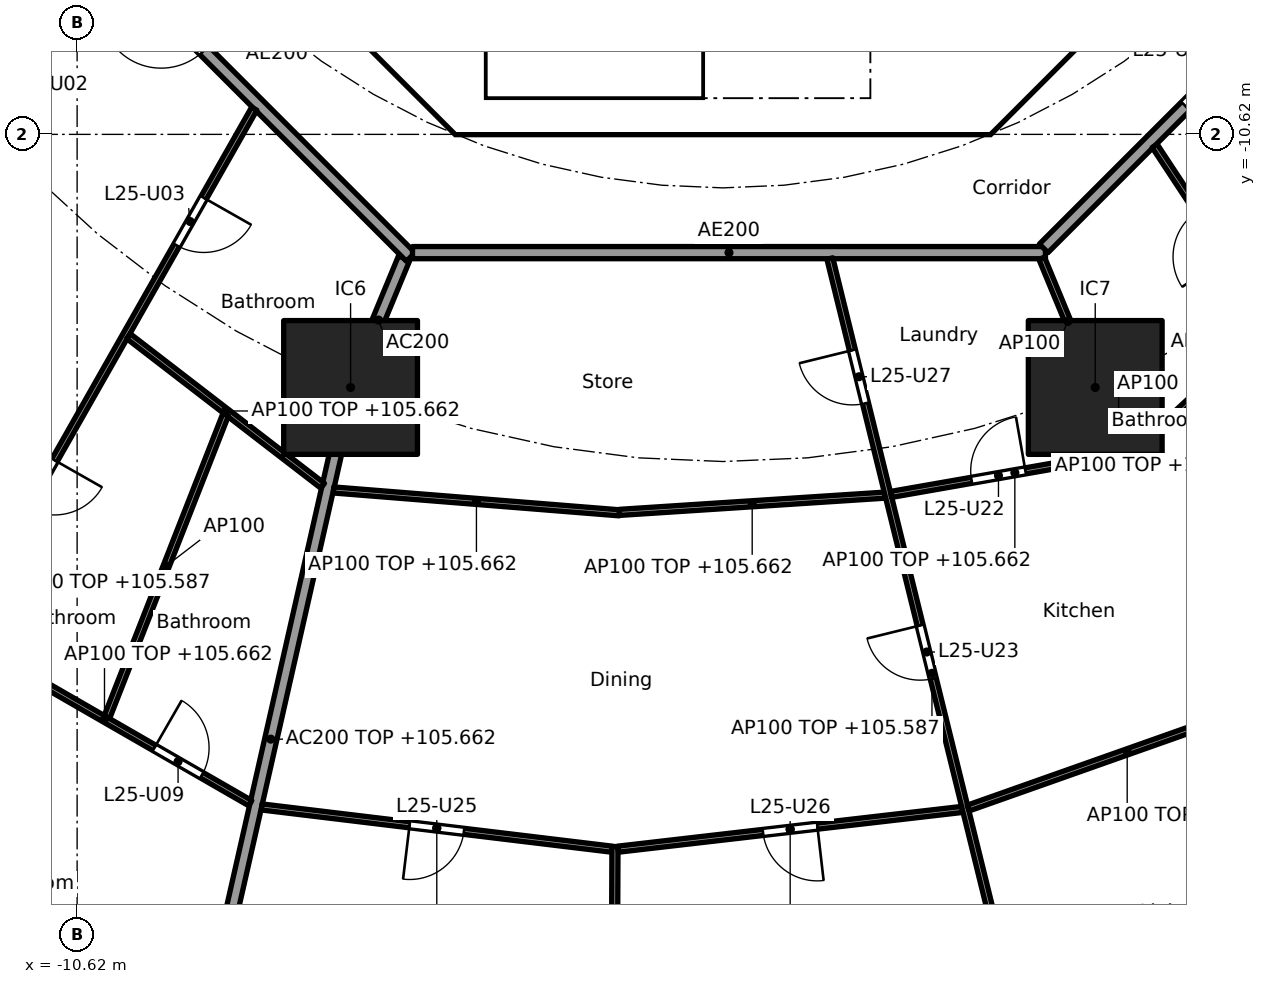
"""IFC4 building model, lengths in metres.
Left out: names, types, materials, properties, quantities, classifications, styles, units other than length and angle.
Written with IfcOpenShell. Run it as: python <this file> out.ifc"""

import sys

from ifc_helpers import new_model, si_unit, direction, frame, frame_2d, origin, origin_2d, place, context, subcontext, project, spatial, polyline, rectangle, outline, extrude, element, fill, save


model = new_model("IFC4")
c1 = context("Model", 3, precision=1e-05, world=origin(), true_north=direction((0.0, 1.0)))
c2 = subcontext(c1, "Body", "Model", "MODEL_VIEW")
j1 = project(units=[si_unit("LENGTHUNIT", "METRE"), si_unit("PLANEANGLEUNIT", "RADIAN")], contexts=[c1])
p1 = place(None, origin())
s1 = spatial("IfcSite", under=j1, at=p1, CompositionType="ELEMENT")
p2 = place(p1, origin())
s2 = spatial("IfcBuilding", under=s1, at=p2, CompositionType="ELEMENT")
p3 = place(p2, frame((0.0, 0.0, 102.9)))
s3 = spatial("IfcBuildingStorey", under=s2, at=p3, CompositionType="ELEMENT", Elevation=102.9)
for number, where, z_axis, x_axis in (
    (1, (-6.123, -14.782, 0.0), (0.0, 0.0, 1.0), (1.0, 0.0, 0.0)),
    (2, (6.123, -14.782, 0.0), (0.0, 0.0, 1.0), (1.0, 0.0, 0.0)),
):
    element("IfcColumn", number, at=place(p3, frame(where, z_axis=z_axis, x_axis=x_axis)), inside=s3, PredefinedType="COLUMN", context=c2, shape_type="SweptSolid", body=[
        extrude(rectangle(XDim=2.2, YDim=2.2, at=origin_2d()), origin(), (0.0, 0.0, 1.0), 3.7),
    ])
p4 = place(p3, frame((-9.988, -4.613, 0.0), z_axis=(0.0, 0.0, 1.0), x_axis=(0.707106781187, -0.707106781187, 0.0)))
e3 = element("IfcWall", 3, at=p4, inside=s3, PredefinedType="SHEAR", context=c2, shape_type="SweptSolid", body=[
    extrude(rectangle(XDim=7.602, YDim=0.6, at=frame_2d((3.801, 0.0))), origin(), (0.0, 0.0, 1.0), 3.44),
])
p5 = place(p4, frame((6.151, 0.0, 0.0)))
e4 = element("IfcOpeningElement", 4, at=p5, cuts=e3, PredefinedType="OPENING", context=c2, shape_type="SweptSolid", body=[
    extrude(rectangle(XDim=1.1, YDim=2.1, at=frame_2d((0.55, 1.05))), frame((0.0, 0.31, 0.0), z_axis=(0.0, -1.0, 0.0), x_axis=(1.0, 0.0, 0.0)), (0.0, 0.0, 1.0), 0.62),
])
p6 = place(p3, frame((4.613, -9.988, 0.0), z_axis=(0.0, 0.0, 1.0), x_axis=(0.707106781187, 0.707106781187, 0.0)))
e5 = element("IfcWall", 5, at=p6, inside=s3, PredefinedType="SHEAR", context=c2, shape_type="SweptSolid", body=[
    extrude(rectangle(XDim=7.602, YDim=0.6, at=frame_2d((3.801, 0.0))), origin(), (0.0, 0.0, 1.0), 3.44),
])
p7 = place(p6, frame((3.201, 0.0, 0.0)))
e6 = element("IfcOpeningElement", 6, at=p7, cuts=e5, PredefinedType="OPENING", context=c2, shape_type="SweptSolid", body=[
    extrude(rectangle(XDim=1.2, YDim=2.1, at=frame_2d((0.6, 1.05))), frame((0.0, 0.31, 0.0), z_axis=(0.0, -1.0, 0.0), x_axis=(1.0, 0.0, 0.0)), (0.0, 0.0, 1.0), 0.62),
])
p8 = place(p3, frame((4.0, -10.025, 0.0), z_axis=(0.0, 0.0, 1.0), x_axis=(0.0, 1.0, 0.0)))
e7 = element("IfcWall", 7, at=p8, inside=s3, PredefinedType="SOLIDWALL", context=c2, shape_type="SweptSolid", body=[
    extrude(rectangle(XDim=3.0, YDim=0.2, at=frame_2d((1.5, 0.0))), origin(), (0.0, 0.0, 1.0), 3.44),
])
p9 = place(p8, frame((0.975, 0.0, 0.0)))
e8 = element("IfcOpeningElement", 8, at=p9, cuts=e7, PredefinedType="OPENING", context=c2, shape_type="SweptSolid", body=[
    extrude(rectangle(XDim=1.1, YDim=2.1, at=frame_2d((0.55, 1.05))), frame((0.0, 0.11, 0.0), z_axis=(0.0, -1.0, 0.0), x_axis=(1.0, 0.0, 0.0)), (0.0, 0.0, 1.0), 0.22),
])
p10 = place(p3, origin())
e9 = element("IfcWall", 9, at=p10, inside=s3, PredefinedType="SHEAR", context=c2, shape_type="SweptSolid", body=[
    extrude(outline(polyline([(-4.152, -10.025), (4.152, -10.025), (4.401, -9.776), (4.825, -10.2), (4.401, -10.625), (-4.401, -10.625), (-4.825, -10.2), (-4.401, -9.776), (-4.152, -10.025)])), origin(), (0.0, 0.0, 1.0), 3.44),
])
p11 = place(p3, origin())
e10 = element("IfcWall", 10, at=p11, inside=s3, PredefinedType="SOLIDWALL", context=c2, shape_type="SweptSolid", body=[
    extrude(outline(polyline([(-3.9, -10.025), (-4.1, -10.025), (-4.1, -7.025), (-3.9, -7.025), (-3.9, -10.025)])), origin(), (0.0, 0.0, 1.0), 3.44),
])
p12 = place(p3, frame((-5.243, -12.657, 0.0), z_axis=(0.0, 0.0, 1.0), x_axis=(-0.382668627144, -0.923885664896, 0.0)))
e11 = element("IfcWall", 11, at=p12, inside=s3, PredefinedType="PARTITIONING", context=c2, shape_type="SweptSolid", body=[
    extrude(rectangle(XDim=2.2, YDim=0.2, at=frame_2d((1.1, 0.0))), origin(), (0.0, 0.0, 1.0), 3.44),
])
p13 = place(p3, frame((-6.134, -14.831, 0.0), z_axis=(0.0, 0.0, 1.0), x_axis=(-0.221225405869, -0.975222702667, 0.0)))
e12 = element("IfcWall", 12, at=p13, inside=s3, PredefinedType="PARTITIONING", context=c2, shape_type="SweptSolid", body=[
    extrude(rectangle(XDim=11.761, YDim=0.2, at=frame_2d((5.88, 0.0))), origin(), (0.0, 0.0, 1.0), 2.762),
])
p14 = place(p3, frame((-12.635, -5.134, 0.0), z_axis=(0.0, 0.0, 1.0), x_axis=(0.707106781187, -0.707106781187, 0.0)))
e13 = element("IfcWall", 13, at=p14, inside=s3, PredefinedType="PARTITIONING", context=c2, shape_type="SweptSolid", body=[
    extrude(rectangle(XDim=10.609, YDim=0.2, at=frame_2d((5.305, 0.0))), origin(), (0.0, 0.0, 1.0), 3.44),
])
p15 = place(p14, frame((4.804, 0.0, 0.0)))
e14 = element("IfcOpeningElement", 14, at=p15, cuts=e13, PredefinedType="OPENING", context=c2, shape_type="SweptSolid", body=[
    extrude(rectangle(XDim=1.0, YDim=2.1, at=frame_2d((0.5, 1.05))), frame((0.0, 0.11, 0.0), z_axis=(0.0, -1.0, 0.0), x_axis=(1.0, 0.0, 0.0)), (0.0, 0.0, 1.0), 0.22),
])
p16 = place(p3, frame((-5.104, -12.565, 0.0), z_axis=(0.0, 0.0, 1.0), x_axis=(1.0, 0.0, 0.0)))
e15 = element("IfcWall", 15, at=p16, inside=s3, PredefinedType="PARTITIONING", context=c2, shape_type="SweptSolid", body=[
    extrude(rectangle(XDim=10.409, YDim=0.2, at=frame_2d((5.205, 0.0))), origin(), (0.0, 0.0, 1.0), 3.44),
])
p17 = place(p3, frame((5.275, -12.494, 0.0), z_axis=(0.0, 0.0, 1.0), x_axis=(0.707106781187, 0.707106781187, 0.0)))
e16 = element("IfcWall", 16, at=p17, inside=s3, PredefinedType="PARTITIONING", context=c2, shape_type="SweptSolid", body=[
    extrude(rectangle(XDim=10.409, YDim=0.2, at=frame_2d((5.205, 0.0))), origin(), (0.0, 0.0, 1.0), 3.44),
])
p18 = place(p17, frame((3.303, 0.0, 0.0)))
e17 = element("IfcOpeningElement", 17, at=p18, cuts=e16, PredefinedType="OPENING", context=c2, shape_type="SweptSolid", body=[
    extrude(rectangle(XDim=1.0, YDim=2.1, at=frame_2d((0.5, 1.05))), frame((0.0, 0.11, 0.0), z_axis=(0.0, -1.0, 0.0), x_axis=(1.0, 0.0, 0.0)), (0.0, 0.0, 1.0), 0.22),
])
p19 = place(p3, frame((-10.181, -7.729, 0.0), z_axis=(0.0, 0.0, 1.0), x_axis=(-0.699710752188, -0.714426247609, 0.0)))
e18 = element("IfcWall", 18, at=p19, inside=s3, PredefinedType="PARTITIONING", context=c2, shape_type="SweptSolid", body=[
    extrude(rectangle(XDim=9.938, YDim=0.1, at=frame_2d((4.969, 0.0))), origin(), (0.0, 0.0, 1.0), 2.687),
])
p20 = place(p19, frame((1.675, 0.0, 0.0)))
e19 = element("IfcOpeningElement", 19, at=p20, cuts=e18, PredefinedType="OPENING", context=c2, shape_type="SweptSolid", body=[
    extrude(rectangle(XDim=0.9, YDim=2.1, at=frame_2d((0.45, 1.05))), frame((0.0, 0.06, 0.0), z_axis=(0.0, -1.0, 0.0), x_axis=(1.0, 0.0, 0.0)), (0.0, 0.0, 1.0), 0.12),
])
p21 = place(p19, frame((6.619, 0.0, 0.0)))
e20 = element("IfcOpeningElement", 20, at=p21, cuts=e18, PredefinedType="OPENING", context=c2, shape_type="SweptSolid", body=[
    extrude(rectangle(XDim=0.9, YDim=2.1, at=frame_2d((0.45, 1.05))), frame((0.0, 0.06, 0.0), z_axis=(0.0, -1.0, 0.0), x_axis=(1.0, 0.0, 0.0)), (0.0, 0.0, 1.0), 0.12),
])
p22 = place(p3, frame((-7.707, -10.198, 0.0), z_axis=(0.0, 0.0, 1.0), x_axis=(-0.49395524734, -0.869487328042, 0.0)))
e21 = element("IfcWall", 21, at=p22, inside=s3, PredefinedType="PARTITIONING", context=c2, shape_type="SweptSolid", body=[
    extrude(rectangle(XDim=15.025, YDim=0.1, at=frame_2d((7.512, 0.0))), origin(), (0.0, 0.0, 1.0), 2.687),
])
p23 = place(p22, frame((1.684, 0.0, 0.0)))
e22 = element("IfcOpeningElement", 22, at=p23, cuts=e21, PredefinedType="OPENING", context=c2, shape_type="SweptSolid", body=[
    extrude(rectangle(XDim=0.9, YDim=2.1, at=frame_2d((0.45, 1.05))), frame((0.0, 0.06, 0.0), z_axis=(0.0, -1.0, 0.0), x_axis=(1.0, 0.0, 0.0)), (0.0, 0.0, 1.0), 0.12),
])
p24 = place(p22, frame((6.648, 0.0, 0.0)))
e23 = element("IfcOpeningElement", 23, at=p24, cuts=e21, PredefinedType="OPENING", context=c2, shape_type="SweptSolid", body=[
    extrude(rectangle(XDim=0.9, YDim=2.1, at=frame_2d((0.45, 1.05))), frame((0.0, 0.06, 0.0), z_axis=(0.0, -1.0, 0.0), x_axis=(1.0, 0.0, 0.0)), (0.0, 0.0, 1.0), 0.12),
])
p25 = place(p22, frame((12.027, 0.0, 0.0)))
e24 = element("IfcOpeningElement", 24, at=p25, cuts=e21, PredefinedType="OPENING", context=c2, shape_type="SweptSolid", body=[
    extrude(rectangle(XDim=0.9, YDim=2.1, at=frame_2d((0.45, 1.05))), frame((0.0, 0.06, 0.0), z_axis=(0.0, -1.0, 0.0), x_axis=(1.0, 0.0, 0.0)), (0.0, 0.0, 1.0), 0.12),
])
p26 = place(p3, frame((-9.775, -13.939, 0.0), z_axis=(0.0, 0.0, 1.0), x_axis=(0.792162117554, -0.610310723741, 0.0)))
e25 = element("IfcWall", 25, at=p26, inside=s3, PredefinedType="PARTITIONING", context=c2, shape_type="SweptSolid", body=[
    extrude(rectangle(XDim=4.03, YDim=0.1, at=frame_2d((2.015, 0.0))), origin(), (0.0, 0.0, 1.0), 2.762),
])
p27 = place(p3, frame((-12.568, -18.856, 0.0), z_axis=(0.0, 0.0, 1.0), x_axis=(0.866533437451, -0.499119025664, 0.0)))
e26 = element("IfcWall", 26, at=p27, inside=s3, PredefinedType="PARTITIONING", context=c2, shape_type="SweptSolid", body=[
    extrude(rectangle(XDim=5.535, YDim=0.1, at=frame_2d((2.768, 0.0))), origin(), (0.0, 0.0, 1.0), 2.762),
])
p28 = place(p27, frame((3.714, 0.0, 0.0)))
e27 = element("IfcOpeningElement", 27, at=p28, cuts=e26, PredefinedType="OPENING", context=c2, shape_type="SweptSolid", body=[
    extrude(rectangle(XDim=0.9, YDim=2.1, at=frame_2d((0.45, 1.05))), frame((0.0, 0.06, 0.0), z_axis=(0.0, -1.0, 0.0), x_axis=(1.0, 0.0, 0.0)), (0.0, 0.0, 1.0), 0.12),
])
p29 = place(p3, frame((-8.177, -15.231, 0.0), z_axis=(0.0, 0.0, 1.0), x_axis=(-0.365520869553, -0.930803144559, 0.0)))
e28 = element("IfcWall", 28, at=p29, inside=s3, PredefinedType="PARTITIONING", context=c2, shape_type="SweptSolid", body=[
    extrude(rectangle(XDim=5.342, YDim=0.1, at=frame_2d((2.671, 0.0))), origin(), (0.0, 0.0, 1.0), 3.44),
])
p30 = place(p3, frame((-6.404, -16.468, 0.0), z_axis=(0.0, 0.0, 1.0), x_axis=(0.996817253426, -0.079720532316, 0.0)))
e29 = element("IfcWall", 29, at=p30, inside=s3, PredefinedType="PARTITIONING", context=c2, shape_type="SweptSolid", body=[
    extrude(rectangle(XDim=4.716, YDim=0.1, at=frame_2d((2.358, 0.0))), origin(), (0.0, 0.0, 1.0), 2.762),
])
p31 = place(p3, frame((-7.586, -21.68, 0.0), z_axis=(0.0, 0.0, 1.0), x_axis=(0.992810189026, -0.119699325668, 0.0)))
e30 = element("IfcWall", 30, at=p31, inside=s3, PredefinedType="PARTITIONING", context=c2, shape_type="SweptSolid", body=[
    extrude(rectangle(XDim=5.803, YDim=0.1, at=frame_2d((2.901, 0.0))), origin(), (0.0, 0.0, 1.0), 2.762),
])
p32 = place(p31, frame((2.451, 0.0, 0.0)))
e31 = element("IfcOpeningElement", 31, at=p32, cuts=e30, PredefinedType="OPENING", context=c2, shape_type="SweptSolid", body=[
    extrude(rectangle(XDim=0.9, YDim=2.1, at=frame_2d((0.45, 1.05))), frame((0.0, 0.06, 0.0), z_axis=(0.0, -1.0, 0.0), x_axis=(1.0, 0.0, 0.0)), (0.0, 0.0, 1.0), 0.12),
])
p33 = place(p3, frame((-1.703, -16.836, 0.0), z_axis=(0.0, 0.0, 1.0), x_axis=(0.997897941075, 0.064805086209, 0.0)))
e32 = element("IfcWall", 32, at=p33, inside=s3, PredefinedType="PARTITIONING", context=c2, shape_type="SweptSolid", body=[
    extrude(rectangle(XDim=4.378, YDim=0.1, at=frame_2d((2.189, 0.0))), origin(), (0.0, 0.0, 1.0), 2.762),
])
p34 = place(p3, frame((-1.775, -22.331, 0.0), z_axis=(0.0, 0.0, 1.0), x_axis=(-0.004088153894, -0.999991643464, 0.0)))
e33 = element("IfcWall", 33, at=p34, inside=s3, PredefinedType="PARTITIONING", context=c2, shape_type="SweptSolid", body=[
    extrude(rectangle(XDim=5.016, YDim=0.1, at=frame_2d((2.508, 0.0))), origin(), (0.0, 0.0, 1.0), 2.762),
])
p35 = place(p3, frame((-1.726, -22.375, 0.0), z_axis=(0.0, 0.0, 1.0), x_axis=(0.99339223329, 0.114768771187, 0.0)))
e34 = element("IfcWall", 34, at=p35, inside=s3, PredefinedType="PARTITIONING", context=c2, shape_type="SweptSolid", body=[
    extrude(rectangle(XDim=5.701, YDim=0.1, at=frame_2d((2.851, 0.0))), origin(), (0.0, 0.0, 1.0), 2.762),
])
p36 = place(p35, frame((2.4, 0.0, 0.0)))
e35 = element("IfcOpeningElement", 35, at=p36, cuts=e34, PredefinedType="OPENING", context=c2, shape_type="SweptSolid", body=[
    extrude(rectangle(XDim=0.9, YDim=2.1, at=frame_2d((0.45, 1.05))), frame((0.0, 0.06, 0.0), z_axis=(0.0, -1.0, 0.0), x_axis=(1.0, 0.0, 0.0)), (0.0, 0.0, 1.0), 0.12),
])
p37 = place(p3, frame((1.759, -12.662, 0.0), z_axis=(0.0, 0.0, 1.0), x_axis=(0.239021819854, -0.971014196412, 0.0)))
e36 = element("IfcWall", 36, at=p37, inside=s3, PredefinedType="PARTITIONING", context=c2, shape_type="SweptSolid", body=[
    extrude(rectangle(XDim=14.05, YDim=0.1, at=frame_2d((7.025, 0.0))), origin(), (0.0, 0.0, 1.0), 2.687),
])
p38 = place(p37, frame((6.214, 0.0, 0.0)))
e37 = element("IfcOpeningElement", 37, at=p38, cuts=e36, PredefinedType="OPENING", context=c2, shape_type="SweptSolid", body=[
    extrude(rectangle(XDim=0.9, YDim=2.1, at=frame_2d((0.45, 1.05))), frame((0.0, 0.06, 0.0), z_axis=(0.0, -1.0, 0.0), x_axis=(1.0, 0.0, 0.0)), (0.0, 0.0, 1.0), 0.12),
])
p39 = place(p37, frame((1.552, 0.0, 0.0)))
e38 = element("IfcOpeningElement", 38, at=p39, cuts=e36, PredefinedType="OPENING", context=c2, shape_type="SweptSolid", body=[
    extrude(rectangle(XDim=0.9, YDim=2.1, at=frame_2d((0.45, 1.05))), frame((0.0, 0.06, 0.0), z_axis=(0.0, -1.0, 0.0), x_axis=(1.0, 0.0, 0.0)), (0.0, 0.0, 1.0), 0.12),
])
p40 = place(p3, frame((2.765, -16.541, 0.0), z_axis=(0.0, 0.0, 1.0), x_axis=(0.984998612286, 0.172562260633, 0.0)))
e39 = element("IfcWall", 39, at=p40, inside=s3, PredefinedType="PARTITIONING", context=c2, shape_type="SweptSolid", body=[
    extrude(rectangle(XDim=4.134, YDim=0.1, at=frame_2d((2.067, 0.0))), origin(), (0.0, 0.0, 1.0), 2.762),
])
p41 = place(p40, frame((1.344, 0.0, 0.0)))
e40 = element("IfcOpeningElement", 40, at=p41, cuts=e39, PredefinedType="OPENING", context=c2, shape_type="SweptSolid", body=[
    extrude(rectangle(XDim=0.9, YDim=2.1, at=frame_2d((0.45, 1.05))), frame((0.0, 0.06, 0.0), z_axis=(0.0, -1.0, 0.0), x_axis=(1.0, 0.0, 0.0)), (0.0, 0.0, 1.0), 0.12),
])
p42 = place(p3, frame((4.034, -21.698, 0.0), z_axis=(0.0, 0.0, 1.0), x_axis=(0.942864271692, 0.333177077794, 0.0)))
e41 = element("IfcWall", 41, at=p42, inside=s3, PredefinedType="PARTITIONING", context=c2, shape_type="SweptSolid", body=[
    extrude(rectangle(XDim=5.545, YDim=0.1, at=frame_2d((2.772, 0.0))), origin(), (0.0, 0.0, 1.0), 2.762),
])
p43 = place(p3, frame((5.243, -12.657, 0.0), z_axis=(0.0, 0.0, 1.0), x_axis=(0.382719158442, -0.923864733477, 0.0)))
e42 = element("IfcWall", 42, at=p43, inside=s3, PredefinedType="PARTITIONING", context=c2, shape_type="SweptSolid", body=[
    extrude(rectangle(XDim=2.25, YDim=0.1, at=frame_2d((1.125, 0.0))), origin(), (0.0, 0.0, 1.0), 3.44),
])
p44 = place(p3, frame((6.824, -15.802, 0.0), z_axis=(0.0, 0.0, 1.0), x_axis=(0.733007232109, 0.680220844782, 0.0)))
e43 = element("IfcWall", 43, at=p44, inside=s3, PredefinedType="PARTITIONING", context=c2, shape_type="SweptSolid", body=[
    extrude(rectangle(XDim=2.969, YDim=0.1, at=frame_2d((1.485, 0.0))), origin(), (0.0, 0.0, 1.0), 2.762),
])
p45 = place(p3, frame((7.1, -10.808, 0.0), z_axis=(0.0, 0.0, 1.0), x_axis=(0.550294419528, -0.834970689208, 0.0)))
e44 = element("IfcWall", 44, at=p45, inside=s3, PredefinedType="PARTITIONING", context=c2, shape_type="SweptSolid", body=[
    extrude(rectangle(XDim=3.472, YDim=0.1, at=frame_2d((1.736, 0.0))), origin(), (0.0, 0.0, 1.0), 2.687),
])
p46 = place(p45, frame((1.286, 0.0, 0.0)))
e45 = element("IfcOpeningElement", 45, at=p46, cuts=e44, PredefinedType="OPENING", context=c2, shape_type="SweptSolid", body=[
    extrude(rectangle(XDim=0.9, YDim=2.1, at=frame_2d((0.45, 1.05))), frame((0.0, 0.06, 0.0), z_axis=(0.0, -1.0, 0.0), x_axis=(1.0, 0.0, 0.0)), (0.0, 0.0, 1.0), 0.12),
])
p47 = place(p3, frame((6.781, -15.638, 0.0), z_axis=(0.0, 0.0, 1.0), x_axis=(-0.533419461524, 0.845850860417, 0.0)))
e46 = element("IfcWall", 46, at=p47, inside=s3, PredefinedType="PARTITIONING", context=c2, shape_type="SweptSolid", body=[
    extrude(rectangle(XDim=1.025, YDim=0.1, at=frame_2d((0.513, 0.0))), origin(), (0.0, 0.0, 1.0), 3.44),
])
p48 = place(p5, origin())
e47 = element("IfcDoor", 47, at=p48, inside=s3, OperationType="SINGLE_SWING_LEFT", PredefinedType="DOOR", context=c2, shape_type="SweptSolid", body=[
    extrude(rectangle(XDim=1.1, YDim=2.1, at=frame_2d((0.55, 1.05))), frame((0.0, 0.025, 0.0), z_axis=(0.0, -1.0, 0.0), x_axis=(1.0, 0.0, 0.0)), (0.0, 0.0, 1.0), 0.05),
])
fill(e4, e47)
p49 = place(p23, origin())
e48 = element("IfcDoor", 48, at=p49, inside=s3, OperationType="SINGLE_SWING_LEFT", PredefinedType="DOOR", context=c2, shape_type="SweptSolid", body=[
    extrude(rectangle(XDim=0.9, YDim=2.1, at=frame_2d((0.45, 1.05))), frame((0.0, 0.025, 0.0), z_axis=(0.0, -1.0, 0.0), x_axis=(1.0, 0.0, 0.0)), (0.0, 0.0, 1.0), 0.05),
])
fill(e22, e48)
p50 = place(p24, origin())
e49 = element("IfcDoor", 49, at=p50, inside=s3, OperationType="SINGLE_SWING_LEFT", PredefinedType="DOOR", context=c2, shape_type="SweptSolid", body=[
    extrude(rectangle(XDim=0.9, YDim=2.1, at=frame_2d((0.45, 1.05))), frame((0.0, 0.025, 0.0), z_axis=(0.0, -1.0, 0.0), x_axis=(1.0, 0.0, 0.0)), (0.0, 0.0, 1.0), 0.05),
])
fill(e23, e49)
p51 = place(p28, origin())
e50 = element("IfcDoor", 50, at=p51, inside=s3, OperationType="SINGLE_SWING_LEFT", PredefinedType="DOOR", context=c2, shape_type="SweptSolid", body=[
    extrude(rectangle(XDim=0.9, YDim=2.1, at=frame_2d((0.45, 1.05))), frame((0.0, 0.025, 0.0), z_axis=(0.0, -1.0, 0.0), x_axis=(1.0, 0.0, 0.0)), (0.0, 0.0, 1.0), 0.05),
])
fill(e27, e50)
p52 = place(p18, frame((1.0, 0.0, 0.0), x_axis=(-1.0, 0.0, 0.0)))
e51 = element("IfcDoor", 51, at=p52, inside=s3, OperationType="SINGLE_SWING_RIGHT", PredefinedType="DOOR", context=c2, shape_type="SweptSolid", body=[
    extrude(rectangle(XDim=1.0, YDim=2.1, at=frame_2d((0.5, 1.05))), frame((0.0, 0.025, 0.0), z_axis=(0.0, -1.0, 0.0), x_axis=(1.0, 0.0, 0.0)), (0.0, 0.0, 1.0), 0.05),
])
fill(e17, e51)
p53 = place(p41, origin())
e52 = element("IfcDoor", 52, at=p53, inside=s3, OperationType="SINGLE_SWING_RIGHT", PredefinedType="DOOR", context=c2, shape_type="SweptSolid", body=[
    extrude(rectangle(XDim=0.9, YDim=2.1, at=frame_2d((0.45, 1.05))), frame((0.0, 0.025, 0.0), z_axis=(0.0, -1.0, 0.0), x_axis=(1.0, 0.0, 0.0)), (0.0, 0.0, 1.0), 0.05),
])
fill(e40, e52)
p54 = place(p38, frame((0.9, 0.0, 0.0), x_axis=(-1.0, 0.0, 0.0)))
e53 = element("IfcDoor", 53, at=p54, inside=s3, OperationType="SINGLE_SWING_RIGHT", PredefinedType="DOOR", context=c2, shape_type="SweptSolid", body=[
    extrude(rectangle(XDim=0.9, YDim=2.1, at=frame_2d((0.45, 1.05))), frame((0.0, 0.025, 0.0), z_axis=(0.0, -1.0, 0.0), x_axis=(1.0, 0.0, 0.0)), (0.0, 0.0, 1.0), 0.05),
])
fill(e37, e53)
p55 = place(p32, frame((0.9, 0.0, 0.0), x_axis=(-1.0, 0.0, 0.0)))
e54 = element("IfcDoor", 54, at=p55, inside=s3, OperationType="SINGLE_SWING_RIGHT", PredefinedType="DOOR", context=c2, shape_type="SweptSolid", body=[
    extrude(rectangle(XDim=0.9, YDim=2.1, at=frame_2d((0.45, 1.05))), frame((0.0, 0.025, 0.0), z_axis=(0.0, -1.0, 0.0), x_axis=(1.0, 0.0, 0.0)), (0.0, 0.0, 1.0), 0.05),
])
fill(e31, e54)
p56 = place(p36, frame((0.9, 0.0, 0.0), x_axis=(-1.0, 0.0, 0.0)))
e55 = element("IfcDoor", 55, at=p56, inside=s3, OperationType="SINGLE_SWING_LEFT", PredefinedType="DOOR", context=c2, shape_type="SweptSolid", body=[
    extrude(rectangle(XDim=0.9, YDim=2.1, at=frame_2d((0.45, 1.05))), frame((0.0, 0.025, 0.0), z_axis=(0.0, -1.0, 0.0), x_axis=(1.0, 0.0, 0.0)), (0.0, 0.0, 1.0), 0.05),
])
fill(e35, e55)
p57 = place(p39, frame((0.9, 0.0, 0.0), x_axis=(-1.0, 0.0, 0.0)))
e56 = element("IfcDoor", 56, at=p57, inside=s3, OperationType="SINGLE_SWING_RIGHT", PredefinedType="DOOR", context=c2, shape_type="SweptSolid", body=[
    extrude(rectangle(XDim=0.9, YDim=2.1, at=frame_2d((0.45, 1.05))), frame((0.0, 0.025, 0.0), z_axis=(0.0, -1.0, 0.0), x_axis=(1.0, 0.0, 0.0)), (0.0, 0.0, 1.0), 0.05),
])
fill(e38, e56)
save(model, sys.argv[1])
